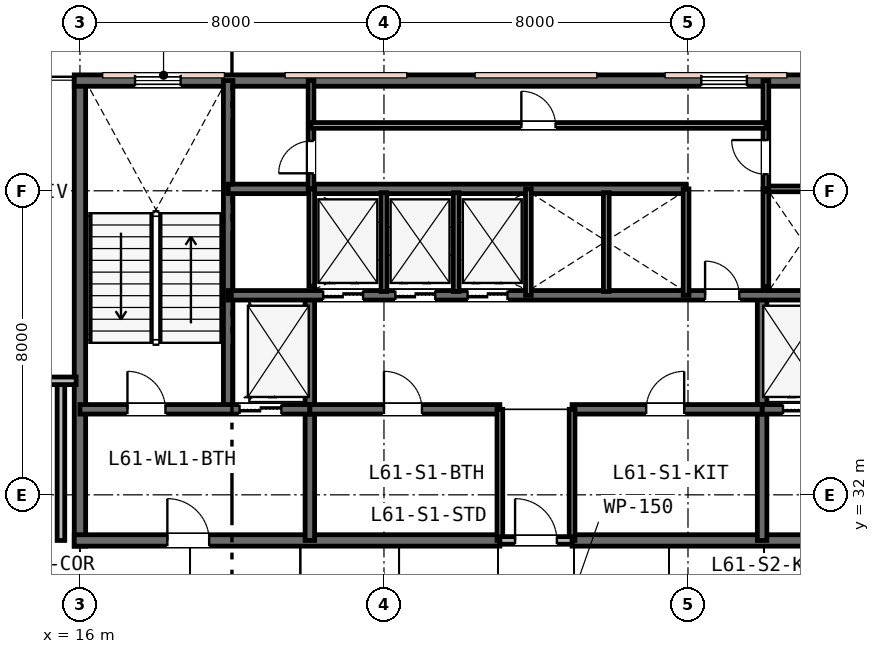
"""IFC4 building model, lengths in metres.
Left out: names, types, materials, properties, quantities, classifications, styles, units other than length and angle.
Written with IfcOpenShell. Run it as: python <this file> out.ifc"""

import sys

from ifc_helpers import new_model, si_unit, direction, frame, frame_2d, origin, place, context, subcontext, project, spatial, rectangle, extrude, element, fill, save


model = new_model("IFC4")
c1 = context("Model", 3, precision=1e-05, world=origin(), true_north=direction((0.0, 1.0)))
c2 = subcontext(c1, "Body", "Model", "MODEL_VIEW")
j1 = project(units=[si_unit("LENGTHUNIT", "METRE"), si_unit("PLANEANGLEUNIT", "RADIAN")], contexts=[c1])
p1 = place(None, origin())
s1 = spatial("IfcSite", under=j1, at=p1, CompositionType="ELEMENT")
p2 = place(p1, origin())
s2 = spatial("IfcBuilding", under=s1, at=p2, CompositionType="ELEMENT")
p3 = place(p2, frame((0.0, 0.0, 237.4)))
s3 = spatial("IfcBuildingStorey", under=s2, at=p3, CompositionType="ELEMENT", Elevation=237.4)
p4 = place(p3, frame((16.0, 30.65, 0.0), z_axis=(0.0, 0.0, 1.0), x_axis=(0.0, 1.0, 0.0)))
e1 = element("IfcWall", 1, at=p4, inside=s3, PredefinedType="SHEAR", context=c2, shape_type="SweptSolid", body=[
    extrude(rectangle(XDim=12.3, YDim=0.3, at=frame_2d((6.15, 0.0))), origin(), (0.0, 0.0, 1.0), 3.8),
])
p5 = place(p3, frame((15.85, 42.9, 0.0), z_axis=(0.0, 0.0, 1.0), x_axis=(1.0, 0.0, 0.0)))
e2 = element("IfcWall", 2, at=p5, inside=s3, PredefinedType="SHEAR", context=c2, shape_type="SweptSolid", body=[
    extrude(rectangle(XDim=24.3, YDim=0.3, at=frame_2d((12.15, 0.0))), origin(), (0.0, 0.0, 1.0), 3.8),
])
p6 = place(p5, frame((1.6, 0.0, 0.95)))
e3 = element("IfcOpeningElement", 3, at=p6, cuts=e2, PredefinedType="OPENING", context=c2, shape_type="SweptSolid", body=[
    extrude(rectangle(XDim=1.2, YDim=1.6, at=frame_2d((0.6, 0.8))), frame((0.0, 0.16, 0.0), z_axis=(0.0, -1.0, 0.0), x_axis=(1.0, 0.0, 0.0)), (0.0, 0.0, 1.0), 0.32),
])
p7 = place(p5, frame((16.5, 0.0, 0.95)))
e4 = element("IfcOpeningElement", 4, at=p7, cuts=e2, PredefinedType="OPENING", context=c2, shape_type="SweptSolid", body=[
    extrude(rectangle(XDim=1.2, YDim=1.6, at=frame_2d((0.6, 0.8))), frame((0.0, 0.16, 0.0), z_axis=(0.0, -1.0, 0.0), x_axis=(1.0, 0.0, 0.0)), (0.0, 0.0, 1.0), 0.32),
])
p8 = place(p5, frame((21.6, 0.0, 0.95)))
e5 = element("IfcOpeningElement", 5, at=p8, cuts=e2, PredefinedType="OPENING", context=c2, shape_type="SweptSolid", body=[
    extrude(rectangle(XDim=1.2, YDim=1.6, at=frame_2d((0.6, 0.8))), frame((0.0, 0.16, 0.0), z_axis=(0.0, -1.0, 0.0), x_axis=(1.0, 0.0, 0.0)), (0.0, 0.0, 1.0), 0.32),
])
p9 = place(p3, frame((15.85, 30.8, 0.0), z_axis=(0.0, 0.0, 1.0), x_axis=(1.0, 0.0, 0.0)))
e6 = element("IfcWall", 6, at=p9, inside=s3, PredefinedType="SHEAR", context=c2, shape_type="SweptSolid", body=[
    extrude(rectangle(XDim=11.2, YDim=0.3, at=frame_2d((5.6, 0.0))), origin(), (0.0, 0.0, 1.0), 3.8),
])
p10 = place(p9, frame((2.45, 0.0, 0.0)))
e7 = element("IfcOpeningElement", 7, at=p10, cuts=e6, PredefinedType="OPENING", context=c2, shape_type="SweptSolid", body=[
    extrude(rectangle(XDim=1.1, YDim=2.15, at=frame_2d((0.55, 1.075))), frame((0.0, 0.16, 0.0), z_axis=(0.0, -1.0, 0.0), x_axis=(1.0, 0.0, 0.0)), (0.0, 0.0, 1.0), 0.32),
])
p11 = place(p3, frame((28.95, 30.8, 0.0), z_axis=(0.0, 0.0, 1.0), x_axis=(1.0, 0.0, 0.0)))
e8 = element("IfcWall", 8, at=p11, inside=s3, PredefinedType="SHEAR", context=c2, shape_type="SweptSolid", body=[
    extrude(rectangle(XDim=11.2, YDim=0.3, at=frame_2d((5.6, 0.0))), origin(), (0.0, 0.0, 1.0), 3.8),
])
p12 = place(p11, frame((7.65, 0.0, 0.0)))
e9 = element("IfcOpeningElement", 9, at=p12, cuts=e8, PredefinedType="OPENING", context=c2, shape_type="SweptSolid", body=[
    extrude(rectangle(XDim=1.1, YDim=2.15, at=frame_2d((0.55, 1.075))), frame((0.0, 0.16, 0.0), z_axis=(0.0, -1.0, 0.0), x_axis=(1.0, 0.0, 0.0)), (0.0, 0.0, 1.0), 0.32),
])
p13 = place(p3, frame((19.9, 34.25, 0.0), z_axis=(0.0, 0.0, 1.0), x_axis=(0.0, 1.0, 0.0)))
e10 = element("IfcWall", 10, at=p13, inside=s3, PredefinedType="SHEAR", context=c2, shape_type="SweptSolid", body=[
    extrude(rectangle(XDim=8.65, YDim=0.25, at=frame_2d((4.325, 0.0))), origin(), (0.0, 0.0, 1.0), 3.8),
])
for number, where, z_axis, x_axis in (
    (11, (22.05, 30.8, 0.0), (0.0, 0.0, 1.0), (0.0, 1.0, 0.0)),
    (12, (33.95, 30.8, 0.0), (0.0, 0.0, 1.0), (0.0, 1.0, 0.0)),
):
    element("IfcWall", number, at=place(p3, frame(where, z_axis=z_axis, x_axis=x_axis)), inside=s3, PredefinedType="SHEAR", context=c2, shape_type="SweptSolid", body=[
        extrude(rectangle(XDim=6.45, YDim=0.25, at=frame_2d((3.225, 0.0))), origin(), (0.0, 0.0, 1.0), 3.8),
    ])
p14 = place(p3, frame((16.0, 34.25, 0.0), z_axis=(0.0, 0.0, 1.0), x_axis=(1.0, 0.0, 0.0)))
e13 = element("IfcWall", 13, at=p14, inside=s3, PredefinedType="SHEAR", context=c2, shape_type="SweptSolid", body=[
    extrude(rectangle(XDim=6.05, YDim=0.25, at=frame_2d((3.025, 0.0))), origin(), (0.0, 0.0, 1.0), 3.8),
])
p15 = place(p14, frame((1.25, 0.0, 0.0)))
e14 = element("IfcOpeningElement", 14, at=p15, cuts=e13, PredefinedType="OPENING", context=c2, shape_type="SweptSolid", body=[
    extrude(rectangle(XDim=1.0, YDim=2.15, at=frame_2d((0.5, 1.075))), frame((0.0, 0.135, 0.0), z_axis=(0.0, -1.0, 0.0), x_axis=(1.0, 0.0, 0.0)), (0.0, 0.0, 1.0), 0.27),
])
p16 = place(p14, frame((4.2, 0.0, 0.0)))
e15 = element("IfcOpeningElement", 15, at=p16, cuts=e13, PredefinedType="OPENING", context=c2, shape_type="SweptSolid", body=[
    extrude(rectangle(XDim=1.1, YDim=2.15, at=frame_2d((0.55, 1.075))), frame((0.0, 0.135, 0.0), z_axis=(0.0, -1.0, 0.0), x_axis=(1.0, 0.0, 0.0)), (0.0, 0.0, 1.0), 0.27),
])
p17 = place(p3, frame((33.95, 34.25, 0.0), z_axis=(0.0, 0.0, 1.0), x_axis=(1.0, 0.0, 0.0)))
e16 = element("IfcWall", 16, at=p17, inside=s3, PredefinedType="SHEAR", context=c2, shape_type="SweptSolid", body=[
    extrude(rectangle(XDim=6.05, YDim=0.25, at=frame_2d((3.025, 0.0))), origin(), (0.0, 0.0, 1.0), 3.8),
])
p18 = place(p17, frame((3.7, 0.0, 0.0)))
e17 = element("IfcOpeningElement", 17, at=p18, cuts=e16, PredefinedType="OPENING", context=c2, shape_type="SweptSolid", body=[
    extrude(rectangle(XDim=1.0, YDim=2.15, at=frame_2d((0.5, 1.075))), frame((0.0, 0.135, 0.0), z_axis=(0.0, -1.0, 0.0), x_axis=(1.0, 0.0, 0.0)), (0.0, 0.0, 1.0), 0.27),
])
p19 = place(p17, frame((0.55, 0.0, 0.0)))
e18 = element("IfcOpeningElement", 18, at=p19, cuts=e16, PredefinedType="OPENING", context=c2, shape_type="SweptSolid", body=[
    extrude(rectangle(XDim=1.1, YDim=2.15, at=frame_2d((0.55, 1.075))), frame((0.0, 0.135, 0.0), z_axis=(0.0, -1.0, 0.0), x_axis=(1.0, 0.0, 0.0)), (0.0, 0.0, 1.0), 0.27),
])
p20 = place(p3, frame((22.05, 34.25, 0.0), z_axis=(0.0, 0.0, 1.0), x_axis=(1.0, 0.0, 0.0)))
e19 = element("IfcWall", 19, at=p20, inside=s3, PredefinedType="SHEAR", context=c2, shape_type="SweptSolid", body=[
    extrude(rectangle(XDim=5.0, YDim=0.25, at=frame_2d((2.5, 0.0))), origin(), (0.0, 0.0, 1.0), 3.8),
])
p21 = place(p20, frame((1.95, 0.0, 0.0)))
e20 = element("IfcOpeningElement", 20, at=p21, cuts=e19, PredefinedType="OPENING", context=c2, shape_type="SweptSolid", body=[
    extrude(rectangle(XDim=1.0, YDim=2.15, at=frame_2d((0.5, 1.075))), frame((0.0, 0.135, 0.0), z_axis=(0.0, -1.0, 0.0), x_axis=(1.0, 0.0, 0.0)), (0.0, 0.0, 1.0), 0.27),
])
p22 = place(p3, frame((28.95, 34.25, 0.0), z_axis=(0.0, 0.0, 1.0), x_axis=(1.0, 0.0, 0.0)))
e21 = element("IfcWall", 21, at=p22, inside=s3, PredefinedType="SHEAR", context=c2, shape_type="SweptSolid", body=[
    extrude(rectangle(XDim=5.0, YDim=0.25, at=frame_2d((2.5, 0.0))), origin(), (0.0, 0.0, 1.0), 3.8),
])
p23 = place(p22, frame((1.95, 0.0, 0.0)))
e22 = element("IfcOpeningElement", 22, at=p23, cuts=e21, PredefinedType="OPENING", context=c2, shape_type="SweptSolid", body=[
    extrude(rectangle(XDim=1.0, YDim=2.15, at=frame_2d((0.5, 1.075))), frame((0.0, 0.135, 0.0), z_axis=(0.0, -1.0, 0.0), x_axis=(1.0, 0.0, 0.0)), (0.0, 0.0, 1.0), 0.27),
])
p24 = place(p3, frame((19.9, 37.25, 0.0), z_axis=(0.0, 0.0, 1.0), x_axis=(1.0, 0.0, 0.0)))
e23 = element("IfcWall", 23, at=p24, inside=s3, PredefinedType="SHEAR", context=c2, shape_type="SweptSolid", body=[
    extrude(rectangle(XDim=16.2, YDim=0.25, at=frame_2d((8.1, 0.0))), origin(), (0.0, 0.0, 1.0), 3.8),
])
p25 = place(p24, frame((12.55, 0.0, 0.0)))
e24 = element("IfcOpeningElement", 24, at=p25, cuts=e23, PredefinedType="OPENING", context=c2, shape_type="SweptSolid", body=[
    extrude(rectangle(XDim=0.9, YDim=2.15, at=frame_2d((0.45, 1.075))), frame((0.0, 0.135, 0.0), z_axis=(0.0, -1.0, 0.0), x_axis=(1.0, 0.0, 0.0)), (0.0, 0.0, 1.0), 0.27),
])
p26 = place(p24, frame((2.5, 0.0, 0.0)))
e25 = element("IfcOpeningElement", 25, at=p26, cuts=e23, PredefinedType="OPENING", context=c2, shape_type="SweptSolid", body=[
    extrude(rectangle(XDim=1.05, YDim=2.15, at=frame_2d((0.525, 1.075))), frame((0.0, 0.135, 0.0), z_axis=(0.0, -1.0, 0.0), x_axis=(1.0, 0.0, 0.0)), (0.0, 0.0, 1.0), 0.27),
])
p27 = place(p24, frame((4.4, 0.0, 0.0)))
e26 = element("IfcOpeningElement", 26, at=p27, cuts=e23, PredefinedType="OPENING", context=c2, shape_type="SweptSolid", body=[
    extrude(rectangle(XDim=1.05, YDim=2.15, at=frame_2d((0.525, 1.075))), frame((0.0, 0.135, 0.0), z_axis=(0.0, -1.0, 0.0), x_axis=(1.0, 0.0, 0.0)), (0.0, 0.0, 1.0), 0.27),
])
p28 = place(p24, frame((6.3, 0.0, 0.0)))
e27 = element("IfcOpeningElement", 27, at=p28, cuts=e23, PredefinedType="OPENING", context=c2, shape_type="SweptSolid", body=[
    extrude(rectangle(XDim=1.05, YDim=2.15, at=frame_2d((0.525, 1.075))), frame((0.0, 0.135, 0.0), z_axis=(0.0, -1.0, 0.0), x_axis=(1.0, 0.0, 0.0)), (0.0, 0.0, 1.0), 0.27),
])
p29 = place(p3, frame((19.9, 40.05, 0.0), z_axis=(0.0, 0.0, 1.0), x_axis=(1.0, 0.0, 0.0)))
e28 = element("IfcWall", 28, at=p29, inside=s3, PredefinedType="SHEAR", context=c2, shape_type="SweptSolid", body=[
    extrude(rectangle(XDim=12.05, YDim=0.25, at=frame_2d((6.025, 0.0))), origin(), (0.0, 0.0, 1.0), 3.8),
])
for number, where, z_axis, x_axis in (
    (29, (27.05, 30.8, 0.0), (0.0, 0.0, 1.0), (0.0, 1.0, 0.0)),
    (30, (28.95, 30.8, 0.0), (0.0, 0.0, 1.0), (0.0, 1.0, 0.0)),
):
    element("IfcWall", number, at=place(p3, frame(where, z_axis=z_axis, x_axis=x_axis)), inside=s3, PredefinedType="PLUMBINGWALL", context=c2, shape_type="SweptSolid", body=[
        extrude(rectangle(XDim=3.45, YDim=0.15, at=frame_2d((1.725, 0.0))), origin(), (0.0, 0.0, 1.0), 3.22),
    ])
p30 = place(p3, frame((27.05, 30.8, 0.0), z_axis=(0.0, 0.0, 1.0), x_axis=(1.0, 0.0, 0.0)))
e31 = element("IfcWall", 31, at=p30, inside=s3, PredefinedType="PARTITIONING", context=c2, shape_type="SweptSolid", body=[
    extrude(rectangle(XDim=1.9, YDim=0.2, at=frame_2d((0.95, 0.0))), origin(), (0.0, 0.0, 1.0), 3.22),
])
p31 = place(p30, frame((0.4, 0.0, 0.0)))
e32 = element("IfcOpeningElement", 32, at=p31, cuts=e31, PredefinedType="OPENING", context=c2, shape_type="SweptSolid", body=[
    extrude(rectangle(XDim=1.1, YDim=2.15, at=frame_2d((0.55, 1.075))), frame((0.0, 0.11, 0.0), z_axis=(0.0, -1.0, 0.0), x_axis=(1.0, 0.0, 0.0)), (0.0, 0.0, 1.0), 0.22),
])
p32 = place(p3, frame((22.1, 37.49, 0.0), z_axis=(0.0, 0.0, 1.0), x_axis=(0.0, 1.0, 0.0)))
e33 = element("IfcWall", 33, at=p32, inside=s3, PredefinedType="PLUMBINGWALL", context=c2, shape_type="SweptSolid", body=[
    extrude(rectangle(XDim=2.56, YDim=0.15, at=frame_2d((1.28, 0.0))), origin(), (0.0, 0.0, 1.0), 3.53),
])
p33 = place(p3, frame((27.8, 37.25, 0.0), z_axis=(0.0, 0.0, 1.0), x_axis=(0.0, 1.0, 0.0)))
e34 = element("IfcWall", 34, at=p33, inside=s3, PredefinedType="PLUMBINGWALL", context=c2, shape_type="SweptSolid", body=[
    extrude(rectangle(XDim=2.8, YDim=0.15, at=frame_2d((1.4, 0.0))), origin(), (0.0, 0.0, 1.0), 3.53),
])
for number, where, z_axis, x_axis in (
    (35, (24.0, 37.35, 0.0), (0.0, 0.0, 1.0), (0.0, 1.0, 0.0)),
    (36, (25.9, 37.35, 0.0), (0.0, 0.0, 1.0), (0.0, 1.0, 0.0)),
):
    element("IfcWall", number, at=place(p3, frame(where, z_axis=z_axis, x_axis=x_axis)), inside=s3, PredefinedType="PLUMBINGWALL", context=c2, shape_type="SweptSolid", body=[
        extrude(rectangle(XDim=2.6, YDim=0.15, at=frame_2d((1.3, 0.0))), origin(), (0.0, 0.0, 1.0), 3.53),
    ])
p34 = place(p3, frame((31.95, 37.25, 0.0), z_axis=(0.0, 0.0, 1.0), x_axis=(0.0, 1.0, 0.0)))
e37 = element("IfcWall", 37, at=p34, inside=s3, PredefinedType="PLUMBINGWALL", context=c2, shape_type="SweptSolid", body=[
    extrude(rectangle(XDim=2.8, YDim=0.15, at=frame_2d((1.4, 0.0))), origin(), (0.0, 0.0, 1.0), 3.53),
])
p35 = place(p3, frame((29.85, 37.35, 0.0), z_axis=(0.0, 0.0, 1.0), x_axis=(0.0, 1.0, 0.0)))
e38 = element("IfcWall", 38, at=p35, inside=s3, PredefinedType="PLUMBINGWALL", context=c2, shape_type="SweptSolid", body=[
    extrude(rectangle(XDim=2.6, YDim=0.15, at=frame_2d((1.3, 0.0))), origin(), (0.0, 0.0, 1.0), 3.53),
])
p36 = place(p3, frame((34.05, 37.473, 0.0), z_axis=(0.0, 0.0, 1.0), x_axis=(0.0, 1.0, 0.0)))
e39 = element("IfcWall", 39, at=p36, inside=s3, PredefinedType="PLUMBINGWALL", context=c2, shape_type="SweptSolid", body=[
    extrude(rectangle(XDim=2.577, YDim=0.15, at=frame_2d((1.288, 0.0))), origin(), (0.0, 0.0, 1.0), 3.53),
])
p37 = place(p3, frame((34.05, 40.05, 0.0), z_axis=(0.0, 0.0, 1.0), x_axis=(1.0, 0.0, 0.0)))
e40 = element("IfcWall", 40, at=p37, inside=s3, PredefinedType="PARTITIONING", context=c2, shape_type="SweptSolid", body=[
    extrude(rectangle(XDim=2.05, YDim=0.15, at=frame_2d((1.025, 0.0))), origin(), (0.0, 0.0, 1.0), 3.53),
])
p38 = place(p3, frame((34.05, 40.05, 0.0), z_axis=(0.0, 0.0, 1.0), x_axis=(0.0, 1.0, 0.0)))
e41 = element("IfcWall", 41, at=p38, inside=s3, PredefinedType="PARTITIONING", context=c2, shape_type="SweptSolid", body=[
    extrude(rectangle(XDim=2.85, YDim=0.15, at=frame_2d((1.425, 0.0))), origin(), (0.0, 0.0, 1.0), 3.53),
])
p39 = place(p38, frame((0.385, 0.0, 0.0)))
e42 = element("IfcOpeningElement", 42, at=p39, cuts=e41, PredefinedType="OPENING", context=c2, shape_type="SweptSolid", body=[
    extrude(rectangle(XDim=0.9, YDim=2.15, at=frame_2d((0.45, 1.075))), frame((0.0, 0.085, 0.0), z_axis=(0.0, -1.0, 0.0), x_axis=(1.0, 0.0, 0.0)), (0.0, 0.0, 1.0), 0.17),
])
p40 = place(p3, frame((22.08, 40.05, 0.0), z_axis=(0.0, 0.0, 1.0), x_axis=(0.0, 1.0, 0.0)))
e43 = element("IfcWall", 43, at=p40, inside=s3, PredefinedType="PARTITIONING", context=c2, shape_type="SweptSolid", body=[
    extrude(rectangle(XDim=2.85, YDim=0.15, at=frame_2d((1.425, 0.0))), origin(), (0.0, 0.0, 1.0), 3.53),
])
p41 = place(p40, frame((0.41, 0.0, 0.0)))
e44 = element("IfcOpeningElement", 44, at=p41, cuts=e43, PredefinedType="OPENING", context=c2, shape_type="SweptSolid", body=[
    extrude(rectangle(XDim=0.85, YDim=2.15, at=frame_2d((0.425, 1.075))), frame((0.0, 0.085, 0.0), z_axis=(0.0, -1.0, 0.0), x_axis=(1.0, 0.0, 0.0)), (0.0, 0.0, 1.0), 0.17),
])
p42 = place(p3, frame((22.08, 41.72, 0.0), z_axis=(0.0, 0.0, 1.0), x_axis=(1.0, 0.0, 0.0)))
e45 = element("IfcWall", 45, at=p42, inside=s3, PredefinedType="PARTITIONING", context=c2, shape_type="SweptSolid", body=[
    extrude(rectangle(XDim=11.97, YDim=0.15, at=frame_2d((5.985, 0.0))), origin(), (0.0, 0.0, 1.0), 3.53),
])
p43 = place(p42, frame((5.535, 0.0, 0.0)))
e46 = element("IfcOpeningElement", 46, at=p43, cuts=e45, PredefinedType="OPENING", context=c2, shape_type="SweptSolid", body=[
    extrude(rectangle(XDim=0.9, YDim=2.15, at=frame_2d((0.45, 1.075))), frame((0.0, 0.085, 0.0), z_axis=(0.0, -1.0, 0.0), x_axis=(1.0, 0.0, 0.0)), (0.0, 0.0, 1.0), 0.17),
])
p44 = place(p3, frame((15.5, 30.8, 0.0), z_axis=(0.0, 0.0, 1.0), x_axis=(0.0, 1.0, 0.0)))
e47 = element("IfcWall", 47, at=p44, inside=s3, PredefinedType="PARTITIONING", context=c2, shape_type="SweptSolid", body=[
    extrude(rectangle(XDim=4.2, YDim=0.2, at=frame_2d((2.1, 0.0))), origin(), (0.0, 0.0, 1.0), 2.92),
])
p45 = place(p3, frame((5.1, 35.0, 0.0), z_axis=(0.0, 0.0, 1.0), x_axis=(1.0, 0.0, 0.0)))
e48 = element("IfcWall", 48, at=p45, inside=s3, PredefinedType="PARTITIONING", context=c2, shape_type="SweptSolid", body=[
    extrude(rectangle(XDim=10.8, YDim=0.2, at=frame_2d((5.4, 0.0))), origin(), (0.0, 0.0, 1.0), 3.24),
])
p46 = place(p45, frame((6.964, 0.0, 0.0)))
e49 = element("IfcOpeningElement", 49, at=p46, cuts=e48, PredefinedType="OPENING", context=c2, shape_type="SweptSolid", body=[
    extrude(rectangle(XDim=0.95, YDim=2.15, at=frame_2d((0.475, 1.075))), frame((0.0, 0.11, 0.0), z_axis=(0.0, -1.0, 0.0), x_axis=(1.0, 0.0, 0.0)), (0.0, 0.0, 1.0), 0.22),
])
p47 = place(p6, origin())
e50 = element("IfcWindow", 50, at=p47, inside=s3, PartitioningType="SINGLE_PANEL", PredefinedType="WINDOW", context=c2, shape_type="SweptSolid", body=[
    extrude(rectangle(XDim=1.2, YDim=1.6, at=frame_2d((0.6, 0.8))), frame((0.0, 0.03, 0.0), z_axis=(0.0, -1.0, 0.0), x_axis=(1.0, 0.0, 0.0)), (0.0, 0.0, 1.0), 0.06),
])
fill(e3, e50)
p48 = place(p7, origin())
e51 = element("IfcWindow", 51, at=p48, inside=s3, PartitioningType="SINGLE_PANEL", PredefinedType="WINDOW", context=c2, shape_type="SweptSolid", body=[
    extrude(rectangle(XDim=1.2, YDim=1.6, at=frame_2d((0.6, 0.8))), frame((0.0, 0.03, 0.0), z_axis=(0.0, -1.0, 0.0), x_axis=(1.0, 0.0, 0.0)), (0.0, 0.0, 1.0), 0.06),
])
fill(e4, e51)
p49 = place(p31, origin())
e52 = element("IfcDoor", 52, at=p49, inside=s3, OperationType="SINGLE_SWING_LEFT", PredefinedType="DOOR", context=c2, shape_type="SweptSolid", body=[
    extrude(rectangle(XDim=1.1, YDim=2.15, at=frame_2d((0.55, 1.075))), frame((0.0, 0.025, 0.0), z_axis=(0.0, -1.0, 0.0), x_axis=(1.0, 0.0, 0.0)), (0.0, 0.0, 1.0), 0.05),
])
fill(e32, e52)
p50 = place(p15, origin())
e53 = element("IfcDoor", 53, at=p50, inside=s3, OperationType="SINGLE_SWING_LEFT", PredefinedType="DOOR", context=c2, shape_type="SweptSolid", body=[
    extrude(rectangle(XDim=1.0, YDim=2.15, at=frame_2d((0.5, 1.075))), frame((0.0, 0.025, 0.0), z_axis=(0.0, -1.0, 0.0), x_axis=(1.0, 0.0, 0.0)), (0.0, 0.0, 1.0), 0.05),
])
fill(e14, e53)
p51 = place(p10, origin())
e54 = element("IfcDoor", 54, at=p51, inside=s3, OperationType="SINGLE_SWING_LEFT", PredefinedType="DOOR", context=c2, shape_type="SweptSolid", body=[
    extrude(rectangle(XDim=1.1, YDim=2.15, at=frame_2d((0.55, 1.075))), frame((0.0, 0.025, 0.0), z_axis=(0.0, -1.0, 0.0), x_axis=(1.0, 0.0, 0.0)), (0.0, 0.0, 1.0), 0.05),
])
fill(e7, e54)
p52 = place(p21, origin())
e55 = element("IfcDoor", 55, at=p52, inside=s3, OperationType="SINGLE_SWING_LEFT", PredefinedType="DOOR", context=c2, shape_type="SweptSolid", body=[
    extrude(rectangle(XDim=1.0, YDim=2.15, at=frame_2d((0.5, 1.075))), frame((0.0, 0.025, 0.0), z_axis=(0.0, -1.0, 0.0), x_axis=(1.0, 0.0, 0.0)), (0.0, 0.0, 1.0), 0.05),
])
fill(e20, e55)
p53 = place(p23, origin())
e56 = element("IfcDoor", 56, at=p53, inside=s3, OperationType="SINGLE_SWING_RIGHT", PredefinedType="DOOR", context=c2, shape_type="SweptSolid", body=[
    extrude(rectangle(XDim=1.0, YDim=2.15, at=frame_2d((0.5, 1.075))), frame((0.0, 0.025, 0.0), z_axis=(0.0, -1.0, 0.0), x_axis=(1.0, 0.0, 0.0)), (0.0, 0.0, 1.0), 0.05),
])
fill(e22, e56)
p54 = place(p25, origin())
e57 = element("IfcDoor", 57, at=p54, inside=s3, OperationType="SINGLE_SWING_LEFT", PredefinedType="DOOR", context=c2, shape_type="SweptSolid", body=[
    extrude(rectangle(XDim=0.9, YDim=2.15, at=frame_2d((0.45, 1.075))), frame((0.0, 0.025, 0.0), z_axis=(0.0, -1.0, 0.0), x_axis=(1.0, 0.0, 0.0)), (0.0, 0.0, 1.0), 0.05),
])
fill(e24, e57)
p55 = place(p39, origin())
e58 = element("IfcDoor", 58, at=p55, inside=s3, OperationType="SINGLE_SWING_RIGHT", PredefinedType="DOOR", context=c2, shape_type="SweptSolid", body=[
    extrude(rectangle(XDim=0.9, YDim=2.15, at=frame_2d((0.45, 1.075))), frame((0.0, 0.025, 0.0), z_axis=(0.0, -1.0, 0.0), x_axis=(1.0, 0.0, 0.0)), (0.0, 0.0, 1.0), 0.05),
])
fill(e42, e58)
p56 = place(p41, origin())
e59 = element("IfcDoor", 59, at=p56, inside=s3, OperationType="SINGLE_SWING_LEFT", PredefinedType="DOOR", context=c2, shape_type="SweptSolid", body=[
    extrude(rectangle(XDim=0.85, YDim=2.15, at=frame_2d((0.425, 1.075))), frame((0.0, 0.025, 0.0), z_axis=(0.0, -1.0, 0.0), x_axis=(1.0, 0.0, 0.0)), (0.0, 0.0, 1.0), 0.05),
])
fill(e44, e59)
p57 = place(p43, origin())
e60 = element("IfcDoor", 60, at=p57, inside=s3, OperationType="SINGLE_SWING_LEFT", PredefinedType="DOOR", context=c2, shape_type="SweptSolid", body=[
    extrude(rectangle(XDim=0.9, YDim=2.15, at=frame_2d((0.45, 1.075))), frame((0.0, 0.025, 0.0), z_axis=(0.0, -1.0, 0.0), x_axis=(1.0, 0.0, 0.0)), (0.0, 0.0, 1.0), 0.05),
])
fill(e46, e60)
p58 = place(p16, origin())
e61 = element("IfcDoor", 61, at=p58, inside=s3, OperationType="DOUBLE_DOOR_SLIDING", PredefinedType="DOOR", context=c2, shape_type="SweptSolid", body=[
    extrude(rectangle(XDim=1.1, YDim=2.15, at=frame_2d((0.55, 1.075))), frame((0.0, 0.025, 0.0), z_axis=(0.0, -1.0, 0.0), x_axis=(1.0, 0.0, 0.0)), (0.0, 0.0, 1.0), 0.05),
])
fill(e15, e61)
p59 = place(p19, origin())
e62 = element("IfcDoor", 62, at=p59, inside=s3, OperationType="DOUBLE_DOOR_SLIDING", PredefinedType="DOOR", context=c2, shape_type="SweptSolid", body=[
    extrude(rectangle(XDim=1.1, YDim=2.15, at=frame_2d((0.55, 1.075))), frame((0.0, 0.025, 0.0), z_axis=(0.0, -1.0, 0.0), x_axis=(1.0, 0.0, 0.0)), (0.0, 0.0, 1.0), 0.05),
])
fill(e18, e62)
p60 = place(p26, origin())
e63 = element("IfcDoor", 63, at=p60, inside=s3, OperationType="DOUBLE_DOOR_SLIDING", PredefinedType="DOOR", context=c2, shape_type="SweptSolid", body=[
    extrude(rectangle(XDim=1.05, YDim=2.15, at=frame_2d((0.525, 1.075))), frame((0.0, 0.025, 0.0), z_axis=(0.0, -1.0, 0.0), x_axis=(1.0, 0.0, 0.0)), (0.0, 0.0, 1.0), 0.05),
])
fill(e25, e63)
p61 = place(p27, origin())
e64 = element("IfcDoor", 64, at=p61, inside=s3, OperationType="DOUBLE_DOOR_SLIDING", PredefinedType="DOOR", context=c2, shape_type="SweptSolid", body=[
    extrude(rectangle(XDim=1.05, YDim=2.15, at=frame_2d((0.525, 1.075))), frame((0.0, 0.025, 0.0), z_axis=(0.0, -1.0, 0.0), x_axis=(1.0, 0.0, 0.0)), (0.0, 0.0, 1.0), 0.05),
])
fill(e26, e64)
p62 = place(p28, origin())
e65 = element("IfcDoor", 65, at=p62, inside=s3, OperationType="DOUBLE_DOOR_SLIDING", PredefinedType="DOOR", context=c2, shape_type="SweptSolid", body=[
    extrude(rectangle(XDim=1.05, YDim=2.15, at=frame_2d((0.525, 1.075))), frame((0.0, 0.025, 0.0), z_axis=(0.0, -1.0, 0.0), x_axis=(1.0, 0.0, 0.0)), (0.0, 0.0, 1.0), 0.05),
])
fill(e27, e65)
save(model, sys.argv[1])
